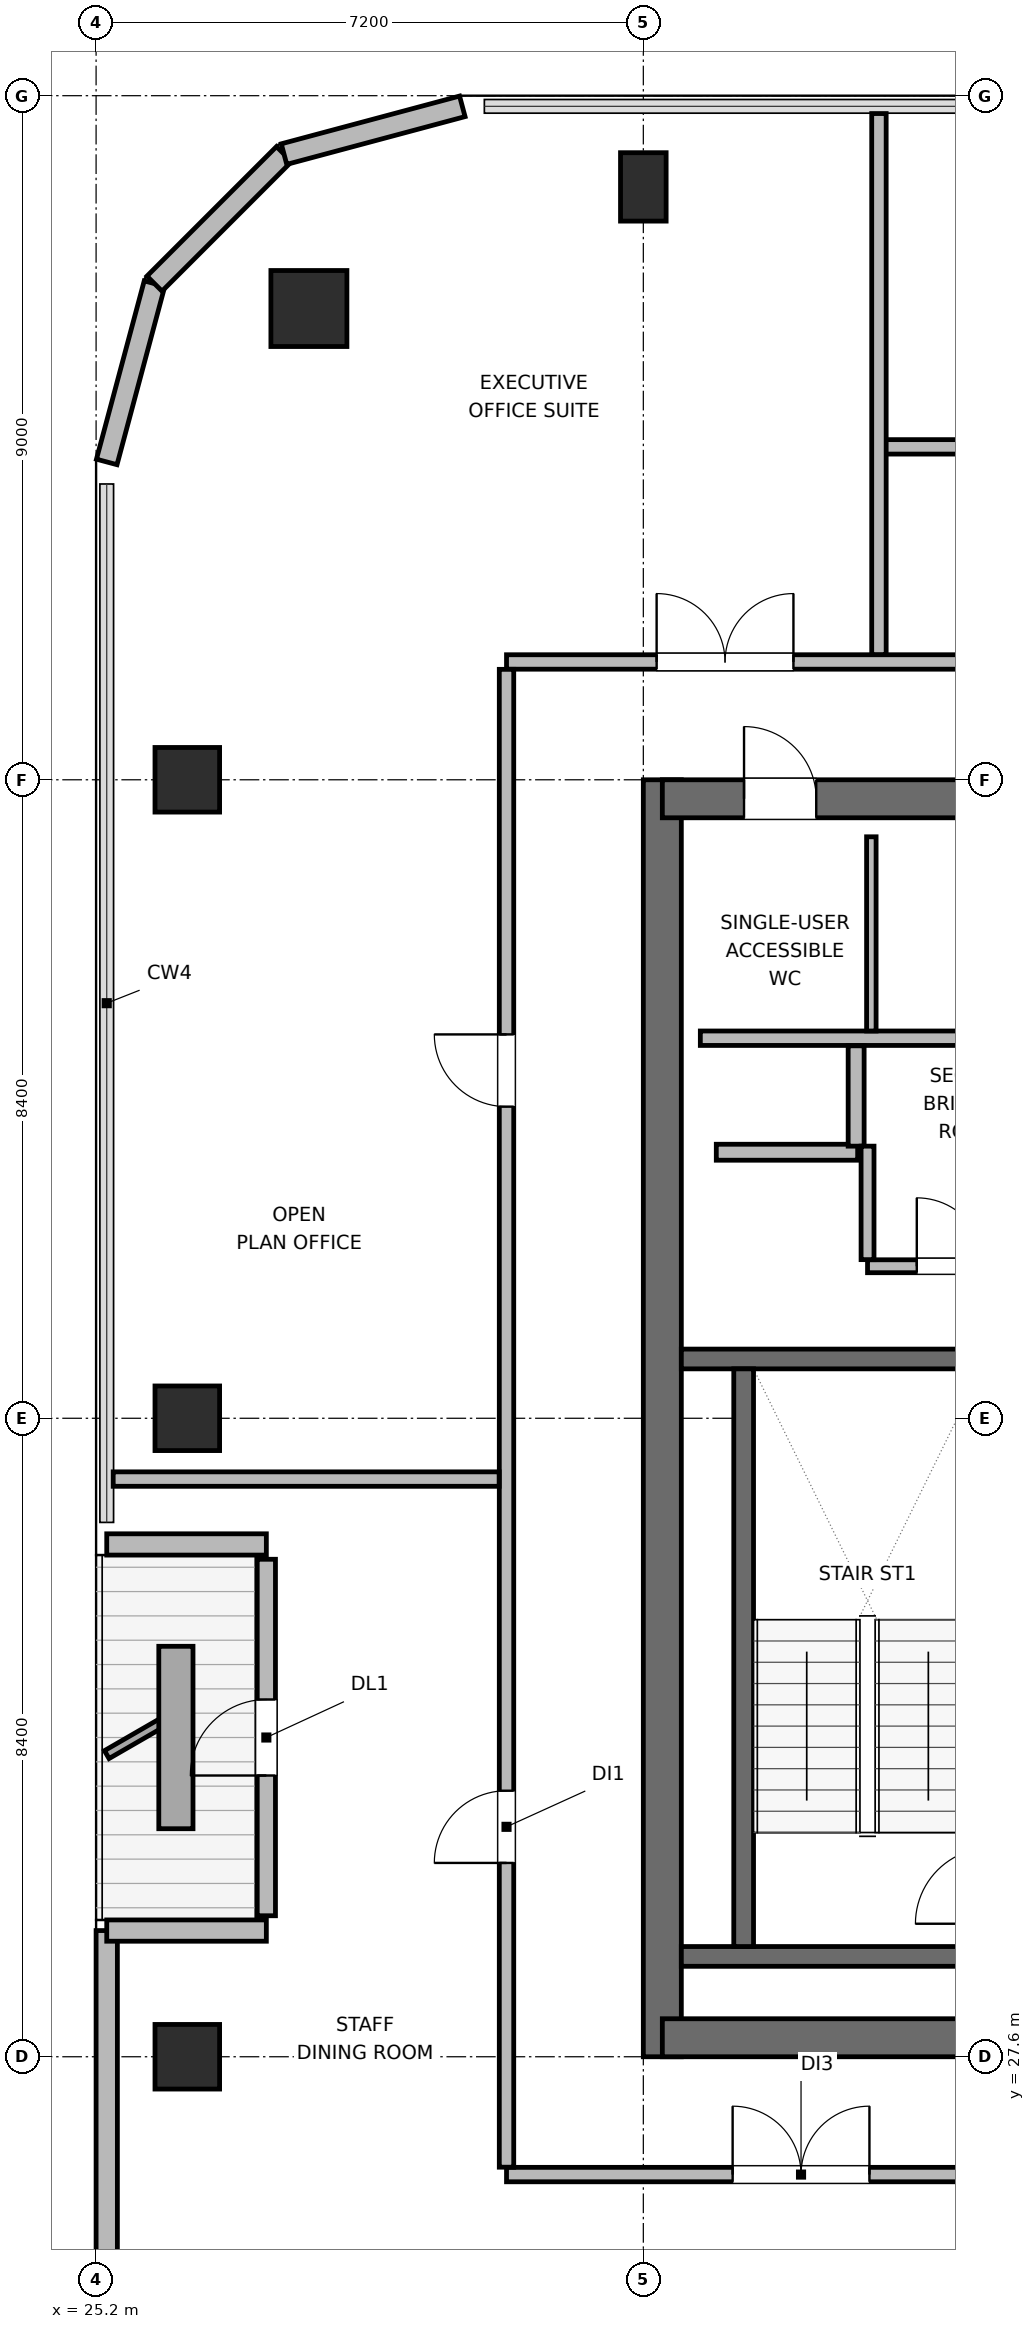
"""IFC4 building model, lengths in metres.
Left out: names, types, materials, properties, quantities, classifications, styles, units other than length and angle.
Written with IfcOpenShell. Run it as: python <this file> out.ifc"""

import sys

from ifc_helpers import new_model, si_unit, direction, frame, frame_2d, origin, origin_2d, place, context, subcontext, project, spatial, rectangle, circle, extrude, element, fill, save


model = new_model("IFC4")
c1 = context("Model", 3, precision=1e-05, world=origin(), true_north=direction((0.0, 1.0)))
c2 = subcontext(c1, "Body", "Model", "MODEL_VIEW")
j1 = project(units=[si_unit("LENGTHUNIT", "METRE"), si_unit("PLANEANGLEUNIT", "RADIAN")], contexts=[c1])
p1 = place(None, origin())
s1 = spatial("IfcSite", under=j1, at=p1, CompositionType="ELEMENT")
p2 = place(p1, origin())
s2 = spatial("IfcBuilding", under=s1, at=p2, CompositionType="ELEMENT")
p3 = place(p2, frame((0.0, 0.0, 325.8)))
s3 = spatial("IfcBuildingStorey", under=s2, at=p3, CompositionType="ELEMENT", Elevation=325.8)
p4 = place(p3, frame((32.65, 27.6, 0.0), z_axis=(0.0, 0.0, 1.0), x_axis=(0.0, 1.0, 0.0)))
e1 = element("IfcWall", 1, at=p4, inside=s3, PredefinedType="SHEAR", context=c2, shape_type="SweptSolid", body=[
    extrude(rectangle(XDim=16.8, YDim=0.5, at=frame_2d((8.4, 0.0))), origin(), (0.0, 0.0, 1.0), 3.9),
])
p5 = place(p3, frame((32.65, 27.85, 0.0), z_axis=(0.0, 0.0, 1.0), x_axis=(1.0, 0.0, 0.0)))
e2 = element("IfcWall", 2, at=p5, inside=s3, PredefinedType="SHEAR", context=c2, shape_type="SweptSolid", body=[
    extrude(rectangle(XDim=9.5, YDim=0.5, at=frame_2d((4.75, 0.0))), origin(), (0.0, 0.0, 1.0), 3.9),
])
p6 = place(p5, frame((5.075, 0.0, 0.0)))
e3 = element("IfcOpeningElement", 3, at=p6, cuts=e2, PredefinedType="OPENING", context=c2, shape_type="SweptSolid", body=[
    extrude(rectangle(XDim=1.05, YDim=2.04, at=frame_2d((0.525, 1.02))), frame((0.0, 0.26, 0.0), z_axis=(0.0, -1.0, 0.0), x_axis=(1.0, 0.0, 0.0)), (0.0, 0.0, 1.0), 0.52),
])
p7 = place(p3, frame((32.65, 44.15, 0.0), z_axis=(0.0, 0.0, 1.0), x_axis=(1.0, 0.0, 0.0)))
e4 = element("IfcWall", 4, at=p7, inside=s3, PredefinedType="SHEAR", context=c2, shape_type="SweptSolid", body=[
    extrude(rectangle(XDim=9.5, YDim=0.5, at=frame_2d((4.75, 0.0))), origin(), (0.0, 0.0, 1.0), 3.9),
])
p8 = place(p7, frame((1.075, 0.0, 0.0)))
e5 = element("IfcOpeningElement", 5, at=p8, cuts=e4, PredefinedType="OPENING", context=c2, shape_type="SweptSolid", body=[
    extrude(rectangle(XDim=0.95, YDim=2.04, at=frame_2d((0.475, 1.02))), frame((0.0, 0.26, 0.0), z_axis=(0.0, -1.0, 0.0), x_axis=(1.0, 0.0, 0.0)), (0.0, 0.0, 1.0), 0.52),
])
p9 = place(p7, frame((4.325, 0.0, 0.0)))
e6 = element("IfcOpeningElement", 6, at=p9, cuts=e4, PredefinedType="OPENING", context=c2, shape_type="SweptSolid", body=[
    extrude(rectangle(XDim=0.9, YDim=2.02, at=frame_2d((0.45, 1.01))), frame((0.0, 0.26, 0.0), z_axis=(0.0, -1.0, 0.0), x_axis=(1.0, 0.0, 0.0)), (0.0, 0.0, 1.0), 0.52),
])
p10 = place(p7, frame((7.225, 0.0, 0.0)))
e7 = element("IfcOpeningElement", 7, at=p10, cuts=e4, PredefinedType="OPENING", context=c2, shape_type="SweptSolid", body=[
    extrude(rectangle(XDim=0.9, YDim=2.02, at=frame_2d((0.45, 1.01))), frame((0.0, 0.26, 0.0), z_axis=(0.0, -1.0, 0.0), x_axis=(1.0, 0.0, 0.0)), (0.0, 0.0, 1.0), 0.52),
])
for number, where, z_axis, x_axis in (
    (8, (32.9, 28.92, 0.0), (0.0, 0.0, 1.0), (1.0, 0.0, 0.0)),
    (9, (32.9, 36.78, 0.0), (0.0, 0.0, 1.0), (1.0, 0.0, 0.0)),
):
    element("IfcWall", number, at=place(p3, frame(where, z_axis=z_axis, x_axis=x_axis)), inside=s3, PredefinedType="SHEAR", context=c2, shape_type="SweptSolid", body=[
        extrude(rectangle(XDim=4.21, YDim=0.26, at=frame_2d((2.105, 0.0))), origin(), (0.0, 0.0, 1.0), 3.9),
    ])
p11 = place(p3, frame((33.72, 29.05, 0.0), z_axis=(0.0, 0.0, 1.0), x_axis=(0.0, 1.0, 0.0)))
e10 = element("IfcWall", 10, at=p11, inside=s3, PredefinedType="SHEAR", context=c2, shape_type="SweptSolid", body=[
    extrude(rectangle(XDim=7.6, YDim=0.26, at=frame_2d((3.8, 0.0))), origin(), (0.0, 0.0, 1.0), 3.9),
])
p12 = place(p3, frame((28.0, 50.6, 0.0), z_axis=(0.0, 0.0, 1.0), x_axis=(1.0, 0.0, 0.0)))
e11 = element("IfcColumn", 11, at=p12, inside=s3, PredefinedType="COLUMN", context=c2, shape_type="SweptSolid", body=[
    extrude(circle(Radius=0.5, at=origin_2d()), origin(), (0.0, 0.0, 1.0), 3.9),
])
p13 = place(p3, frame((32.4, 52.2, 0.0), z_axis=(0.0, 0.0, 1.0), x_axis=(1.0, 0.0, 0.0)))
e12 = element("IfcColumn", 12, at=p13, inside=s3, PredefinedType="COLUMN", context=c2, shape_type="SweptSolid", body=[
    extrude(rectangle(XDim=0.6, YDim=0.9, at=origin_2d()), origin(), (0.0, 0.0, 1.0), 3.9),
])
for number, where, z_axis, x_axis in (
    (13, (26.4, 27.6, 0.0), (0.0, 0.0, 1.0), (1.0, 0.0, 0.0)),
    (14, (26.4, 36.0, 0.0), (0.0, 0.0, 1.0), (1.0, 0.0, 0.0)),
    (15, (26.4, 44.4, 0.0), (0.0, 0.0, 1.0), (1.0, 0.0, 0.0)),
):
    element("IfcColumn", number, at=place(p3, frame(where, z_axis=z_axis, x_axis=x_axis)), inside=s3, PredefinedType="COLUMN", context=c2, shape_type="SweptSolid", body=[
        extrude(rectangle(XDim=0.85, YDim=0.85, at=origin_2d()), origin(), (0.0, 0.0, 1.0), 3.9),
    ])
p14 = place(p3, frame((25.34, 23.418, 0.0), z_axis=(0.0, 0.0, 1.0), x_axis=(0.0, 1.0, 0.0)))
e16 = element("IfcWall", 16, at=p14, inside=s3, PredefinedType="SOLIDWALL", context=c2, shape_type="SweptSolid", body=[
    extrude(rectangle(XDim=5.842, YDim=0.28, at=frame_2d((2.921, 0.0))), origin(), (0.0, 0.0, 1.0), 3.68),
])
p15 = place(p3, frame((25.34, 29.26, 0.0), z_axis=(0.0, 0.0, 1.0), x_axis=(1.0, 0.0, 0.0)))
e17 = element("IfcWall", 17, at=p15, inside=s3, PredefinedType="SOLIDWALL", context=c2, shape_type="SweptSolid", body=[
    extrude(rectangle(XDim=2.1, YDim=0.28, at=frame_2d((1.05, 0.0))), origin(), (0.0, 0.0, 1.0), 3.126),
])
p16 = place(p3, frame((27.44, 29.455, 0.0), z_axis=(0.0, 0.0, 1.0), x_axis=(0.0, 1.0, 0.0)))
e18 = element("IfcWall", 18, at=p16, inside=s3, PredefinedType="SOLIDWALL", context=c2, shape_type="SweptSolid", body=[
    extrude(rectangle(XDim=4.69, YDim=0.24, at=frame_2d((2.345, 0.0))), origin(), (0.0, 0.0, 1.0), 3.311),
])
p17 = place(p16, frame((1.845, 0.0, 0.0)))
e19 = element("IfcOpeningElement", 19, at=p17, cuts=e18, PredefinedType="OPENING", context=c2, shape_type="SweptSolid", body=[
    extrude(rectangle(XDim=1.0, YDim=2.02, at=frame_2d((0.5, 1.01))), frame((0.0, 0.13, 0.0), z_axis=(0.0, -1.0, 0.0), x_axis=(1.0, 0.0, 0.0)), (0.0, 0.0, 1.0), 0.26),
])
p18 = place(p3, frame((27.44, 34.34, 0.0), z_axis=(0.0, 0.0, 1.0), x_axis=(-1.0, 0.0, 0.0)))
e20 = element("IfcWall", 20, at=p18, inside=s3, PredefinedType="SOLIDWALL", context=c2, shape_type="SweptSolid", body=[
    extrude(rectangle(XDim=2.1, YDim=0.28, at=frame_2d((1.05, 0.0))), origin(), (0.0, 0.0, 1.0), 3.126),
])
p19 = place(p3, frame((25.34, 48.582, 0.0), z_axis=(0.0, 0.0, 1.0), x_axis=(0.258751159445, 0.965944013639, 0.0)))
e21 = element("IfcWall", 21, at=p19, inside=s3, PredefinedType="SOLIDWALL", context=c2, shape_type="SweptSolid", body=[
    extrude(rectangle(XDim=2.429, YDim=0.28, at=frame_2d((1.214, 0.0))), origin(), (0.0, 0.0, 1.0), 3.68),
])
p20 = place(p3, frame((25.969, 50.927, 0.0), z_axis=(0.0, 0.0, 1.0), x_axis=(0.707106781187, 0.707106781187, 0.0)))
e22 = element("IfcWall", 22, at=p20, inside=s3, PredefinedType="SOLIDWALL", context=c2, shape_type="SweptSolid", body=[
    extrude(rectangle(XDim=2.41, YDim=0.28, at=frame_2d((1.205, 0.0))), origin(), (0.0, 0.0, 1.0), 3.68),
])
p21 = place(p3, frame((27.673, 52.632, 0.0), z_axis=(0.0, 0.0, 1.0), x_axis=(0.965937282298, 0.25877628691, 0.0)))
e23 = element("IfcWall", 23, at=p21, inside=s3, PredefinedType="SOLIDWALL", context=c2, shape_type="SweptSolid", body=[
    extrude(rectangle(XDim=2.428, YDim=0.28, at=frame_2d((1.214, 0.0))), origin(), (0.0, 0.0, 1.0), 3.68),
])
p22 = place(p3, frame((33.15, 41.0, 0.0), z_axis=(0.0, 0.0, 1.0), x_axis=(1.0, 0.0, 0.0)))
e24 = element("IfcWall", 24, at=p22, inside=s3, PredefinedType="PLUMBINGWALL", context=c2, shape_type="SweptSolid", body=[
    extrude(rectangle(XDim=8.5, YDim=0.19, at=frame_2d((4.25, 0.0))), origin(), (0.0, 0.0, 1.0), 3.68),
])
p23 = place(p3, frame((35.4, 41.095, 0.0), z_axis=(0.0, 0.0, 1.0), x_axis=(0.0, 1.0, 0.0)))
e25 = element("IfcWall", 25, at=p23, inside=s3, PredefinedType="PARTITIONING", context=c2, shape_type="SweptSolid", body=[
    extrude(rectangle(XDim=2.555, YDim=0.125, at=frame_2d((1.277, 0.0))), origin(), (0.0, 0.0, 1.0), 3.68),
])
p24 = place(p3, frame((33.36, 39.5, 0.0), z_axis=(0.0, 0.0, 1.0), x_axis=(1.0, 0.0, 0.0)))
e26 = element("IfcWall", 26, at=p24, inside=s3, PredefinedType="PARTITIONING", context=c2, shape_type="SweptSolid", body=[
    extrude(rectangle(XDim=1.86, YDim=0.21, at=frame_2d((0.93, 0.0))), origin(), (0.0, 0.0, 1.0), 3.68),
])
p25 = place(p3, frame((35.2, 39.58, 0.0), z_axis=(0.0, 0.0, 1.0), x_axis=(0.0, 1.0, 0.0)))
e27 = element("IfcWall", 27, at=p25, inside=s3, PredefinedType="PARTITIONING", context=c2, shape_type="SweptSolid", body=[
    extrude(rectangle(XDim=1.32, YDim=0.21, at=frame_2d((0.66, 0.0))), origin(), (0.0, 0.0, 1.0), 3.68),
])
p26 = place(p3, frame((35.35, 38.0, 0.0), z_axis=(0.0, 0.0, 1.0), x_axis=(1.0, 0.0, 0.0)))
e28 = element("IfcWall", 28, at=p26, inside=s3, PredefinedType="PARTITIONING", context=c2, shape_type="SweptSolid", body=[
    extrude(rectangle(XDim=6.1, YDim=0.17, at=frame_2d((3.05, 0.0))), origin(), (0.0, 0.0, 1.0), 3.68),
])
p27 = place(p26, frame((0.648, 0.0, 0.0)))
e29 = element("IfcOpeningElement", 29, at=p27, cuts=e28, PredefinedType="OPENING", context=c2, shape_type="SweptSolid", body=[
    extrude(rectangle(XDim=0.9, YDim=2.02, at=frame_2d((0.45, 1.01))), frame((0.0, 0.095, 0.0), z_axis=(0.0, -1.0, 0.0), x_axis=(1.0, 0.0, 0.0)), (0.0, 0.0, 1.0), 0.19),
])
p28 = place(p26, frame((3.698, 0.0, 0.0)))
e30 = element("IfcOpeningElement", 30, at=p28, cuts=e28, PredefinedType="OPENING", context=c2, shape_type="SweptSolid", body=[
    extrude(rectangle(XDim=0.9, YDim=2.02, at=frame_2d((0.45, 1.01))), frame((0.0, 0.095, 0.0), z_axis=(0.0, -1.0, 0.0), x_axis=(1.0, 0.0, 0.0)), (0.0, 0.0, 1.0), 0.19),
])
p29 = place(p3, frame((35.35, 38.087, 0.0), z_axis=(0.0, 0.0, 1.0), x_axis=(0.0, 1.0, 0.0)))
e31 = element("IfcWall", 31, at=p29, inside=s3, PredefinedType="PARTITIONING", context=c2, shape_type="SweptSolid", body=[
    extrude(rectangle(XDim=1.493, YDim=0.17, at=frame_2d((0.747, 0.0))), origin(), (0.0, 0.0, 1.0), 3.68),
])
p30 = place(p3, frame((30.6, 26.05, 0.0), z_axis=(0.0, 0.0, 1.0), x_axis=(1.0, 0.0, 0.0)))
e32 = element("IfcWall", 32, at=p30, inside=s3, PredefinedType="PLUMBINGWALL", context=c2, shape_type="SweptSolid", body=[
    extrude(rectangle(XDim=36.3, YDim=0.19, at=frame_2d((18.15, 0.0))), origin(), (0.0, 0.0, 1.0), 3.68),
])
p31 = place(p30, frame((2.975, 0.0, 0.0)))
e33 = element("IfcOpeningElement", 33, at=p31, cuts=e32, PredefinedType="OPENING", context=c2, shape_type="SweptSolid", body=[
    extrude(rectangle(XDim=1.8, YDim=2.06, at=frame_2d((0.9, 1.03))), frame((0.0, 0.105, 0.0), z_axis=(0.0, -1.0, 0.0), x_axis=(1.0, 0.0, 0.0)), (0.0, 0.0, 1.0), 0.21),
])
p32 = place(p30, frame((13.425, 0.0, 0.0)))
e34 = element("IfcOpeningElement", 34, at=p32, cuts=e32, PredefinedType="OPENING", context=c2, shape_type="SweptSolid", body=[
    extrude(rectangle(XDim=1.8, YDim=2.06, at=frame_2d((0.9, 1.03))), frame((0.0, 0.105, 0.0), z_axis=(0.0, -1.0, 0.0), x_axis=(1.0, 0.0, 0.0)), (0.0, 0.0, 1.0), 0.21),
])
p33 = place(p30, frame((28.125, 0.0, 0.0)))
e35 = element("IfcOpeningElement", 35, at=p33, cuts=e32, PredefinedType="OPENING", context=c2, shape_type="SweptSolid", body=[
    extrude(rectangle(XDim=1.8, YDim=2.06, at=frame_2d((0.9, 1.03))), frame((0.0, 0.105, 0.0), z_axis=(0.0, -1.0, 0.0), x_axis=(1.0, 0.0, 0.0)), (0.0, 0.0, 1.0), 0.21),
])
p34 = place(p3, frame((30.6, 45.95, 0.0), z_axis=(0.0, 0.0, 1.0), x_axis=(1.0, 0.0, 0.0)))
e36 = element("IfcWall", 36, at=p34, inside=s3, PredefinedType="PLUMBINGWALL", context=c2, shape_type="SweptSolid", body=[
    extrude(rectangle(XDim=36.3, YDim=0.19, at=frame_2d((18.15, 0.0))), origin(), (0.0, 0.0, 1.0), 3.68),
])
p35 = place(p34, frame((1.975, 0.0, 0.0)))
e37 = element("IfcOpeningElement", 37, at=p35, cuts=e36, PredefinedType="OPENING", context=c2, shape_type="SweptSolid", body=[
    extrude(rectangle(XDim=1.8, YDim=2.06, at=frame_2d((0.9, 1.03))), frame((0.0, 0.105, 0.0), z_axis=(0.0, -1.0, 0.0), x_axis=(1.0, 0.0, 0.0)), (0.0, 0.0, 1.0), 0.21),
])
p36 = place(p34, frame((9.925, 0.0, 0.0)))
e38 = element("IfcOpeningElement", 38, at=p36, cuts=e36, PredefinedType="OPENING", context=c2, shape_type="SweptSolid", body=[
    extrude(rectangle(XDim=1.8, YDim=2.06, at=frame_2d((0.9, 1.03))), frame((0.0, 0.105, 0.0), z_axis=(0.0, -1.0, 0.0), x_axis=(1.0, 0.0, 0.0)), (0.0, 0.0, 1.0), 0.21),
])
p37 = place(p34, frame((20.925, 0.0, 0.0)))
e39 = element("IfcOpeningElement", 39, at=p37, cuts=e36, PredefinedType="OPENING", context=c2, shape_type="SweptSolid", body=[
    extrude(rectangle(XDim=1.8, YDim=2.06, at=frame_2d((0.9, 1.03))), frame((0.0, 0.105, 0.0), z_axis=(0.0, -1.0, 0.0), x_axis=(1.0, 0.0, 0.0)), (0.0, 0.0, 1.0), 0.21),
])
p38 = place(p34, frame((31.125, 0.0, 0.0)))
e40 = element("IfcOpeningElement", 40, at=p38, cuts=e36, PredefinedType="OPENING", context=c2, shape_type="SweptSolid", body=[
    extrude(rectangle(XDim=1.8, YDim=2.06, at=frame_2d((0.9, 1.03))), frame((0.0, 0.105, 0.0), z_axis=(0.0, -1.0, 0.0), x_axis=(1.0, 0.0, 0.0)), (0.0, 0.0, 1.0), 0.21),
])
p39 = place(p3, frame((30.6, 26.147, 0.0), z_axis=(0.0, 0.0, 1.0), x_axis=(0.0, 1.0, 0.0)))
e41 = element("IfcWall", 41, at=p39, inside=s3, PredefinedType="PLUMBINGWALL", context=c2, shape_type="SweptSolid", body=[
    extrude(rectangle(XDim=19.706, YDim=0.19, at=frame_2d((9.853, 0.0))), origin(), (0.0, 0.0, 1.0), 3.68),
])
p40 = place(p39, frame((4.003, 0.0, 0.0)))
e42 = element("IfcOpeningElement", 42, at=p40, cuts=e41, PredefinedType="OPENING", context=c2, shape_type="SweptSolid", body=[
    extrude(rectangle(XDim=0.95, YDim=2.04, at=frame_2d((0.475, 1.02))), frame((0.0, 0.105, 0.0), z_axis=(0.0, -1.0, 0.0), x_axis=(1.0, 0.0, 0.0)), (0.0, 0.0, 1.0), 0.21),
])
p41 = place(p39, frame((13.953, 0.0, 0.0)))
e43 = element("IfcOpeningElement", 43, at=p41, cuts=e41, PredefinedType="OPENING", context=c2, shape_type="SweptSolid", body=[
    extrude(rectangle(XDim=0.95, YDim=2.04, at=frame_2d((0.475, 1.02))), frame((0.0, 0.105, 0.0), z_axis=(0.0, -1.0, 0.0), x_axis=(1.0, 0.0, 0.0)), (0.0, 0.0, 1.0), 0.21),
])
p42 = place(p3, frame((35.5, 48.78, 0.0), z_axis=(0.0, 0.0, 1.0), x_axis=(1.0, 0.0, 0.0)))
e44 = element("IfcWall", 44, at=p42, inside=s3, PredefinedType="PLUMBINGWALL", context=c2, shape_type="SweptSolid", body=[
    extrude(rectangle(XDim=11.0, YDim=0.19, at=frame_2d((5.5, 0.0))), origin(), (0.0, 0.0, 1.0), 3.311),
])
p43 = place(p42, frame((5.05, 0.0, 0.0)))
e45 = element("IfcOpeningElement", 45, at=p43, cuts=e44, PredefinedType="OPENING", context=c2, shape_type="SweptSolid", body=[
    extrude(rectangle(XDim=0.9, YDim=2.02, at=frame_2d((0.45, 1.01))), frame((0.0, 0.105, 0.0), z_axis=(0.0, -1.0, 0.0), x_axis=(1.0, 0.0, 0.0)), (0.0, 0.0, 1.0), 0.21),
])
p44 = place(p3, frame((35.5, 46.047, 0.0), z_axis=(0.0, 0.0, 1.0), x_axis=(0.0, 1.0, 0.0)))
e46 = element("IfcWall", 46, at=p44, inside=s3, PredefinedType="PLUMBINGWALL", context=c2, shape_type="SweptSolid", body=[
    extrude(rectangle(XDim=7.118, YDim=0.19, at=frame_2d((3.559, 0.0))), origin(), (0.0, 0.0, 1.0), 3.68),
])
p45 = place(p3, frame((25.425, 35.2, 0.0), z_axis=(0.0, 0.0, 1.0), x_axis=(1.0, 0.0, 0.0)))
e47 = element("IfcWall", 47, at=p45, inside=s3, PredefinedType="PLUMBINGWALL", context=c2, shape_type="SweptSolid", body=[
    extrude(rectangle(XDim=5.078, YDim=0.19, at=frame_2d((2.539, 0.0))), origin(), (0.0, 0.0, 1.0), 3.68),
])
p46 = place(p17, origin())
e48 = element("IfcDoor", 48, at=p46, inside=s3, OperationType="SINGLE_SWING_LEFT", PredefinedType="DOOR", context=c2, shape_type="SweptSolid", body=[
    extrude(rectangle(XDim=1.0, YDim=2.02, at=frame_2d((0.5, 1.01))), frame((0.0, 0.025, 0.0), z_axis=(0.0, -1.0, 0.0), x_axis=(1.0, 0.0, 0.0)), (0.0, 0.0, 1.0), 0.05),
])
fill(e19, e48)
p47 = place(p8, origin())
e49 = element("IfcDoor", 49, at=p47, inside=s3, OperationType="SINGLE_SWING_LEFT", PredefinedType="DOOR", context=c2, shape_type="SweptSolid", body=[
    extrude(rectangle(XDim=0.95, YDim=2.04, at=frame_2d((0.475, 1.02))), frame((0.0, 0.025, 0.0), z_axis=(0.0, -1.0, 0.0), x_axis=(1.0, 0.0, 0.0)), (0.0, 0.0, 1.0), 0.05),
])
fill(e5, e49)
p48 = place(p27, origin())
e50 = element("IfcDoor", 50, at=p48, inside=s3, OperationType="SINGLE_SWING_LEFT", PredefinedType="DOOR", context=c2, shape_type="SweptSolid", body=[
    extrude(rectangle(XDim=0.9, YDim=2.02, at=frame_2d((0.45, 1.01))), frame((0.0, 0.025, 0.0), z_axis=(0.0, -1.0, 0.0), x_axis=(1.0, 0.0, 0.0)), (0.0, 0.0, 1.0), 0.05),
])
fill(e29, e50)
p49 = place(p31, origin())
e51 = element("IfcDoor", 51, at=p49, inside=s3, OperationType="DOUBLE_DOOR_SINGLE_SWING", PredefinedType="DOOR", context=c2, shape_type="SweptSolid", body=[
    extrude(rectangle(XDim=1.8, YDim=2.06, at=frame_2d((0.9, 1.03))), frame((0.0, 0.025, 0.0), z_axis=(0.0, -1.0, 0.0), x_axis=(1.0, 0.0, 0.0)), (0.0, 0.0, 1.0), 0.05),
])
fill(e33, e51)
p50 = place(p35, origin())
e52 = element("IfcDoor", 52, at=p50, inside=s3, OperationType="DOUBLE_DOOR_SINGLE_SWING", PredefinedType="DOOR", context=c2, shape_type="SweptSolid", body=[
    extrude(rectangle(XDim=1.8, YDim=2.06, at=frame_2d((0.9, 1.03))), frame((0.0, 0.025, 0.0), z_axis=(0.0, -1.0, 0.0), x_axis=(1.0, 0.0, 0.0)), (0.0, 0.0, 1.0), 0.05),
])
fill(e37, e52)
p51 = place(p40, origin())
e53 = element("IfcDoor", 53, at=p51, inside=s3, OperationType="SINGLE_SWING_LEFT", PredefinedType="DOOR", context=c2, shape_type="SweptSolid", body=[
    extrude(rectangle(XDim=0.95, YDim=2.04, at=frame_2d((0.475, 1.02))), frame((0.0, 0.025, 0.0), z_axis=(0.0, -1.0, 0.0), x_axis=(1.0, 0.0, 0.0)), (0.0, 0.0, 1.0), 0.05),
])
fill(e42, e53)
p52 = place(p41, origin())
e54 = element("IfcDoor", 54, at=p52, inside=s3, OperationType="SINGLE_SWING_RIGHT", PredefinedType="DOOR", context=c2, shape_type="SweptSolid", body=[
    extrude(rectangle(XDim=0.95, YDim=2.04, at=frame_2d((0.475, 1.02))), frame((0.0, 0.025, 0.0), z_axis=(0.0, -1.0, 0.0), x_axis=(1.0, 0.0, 0.0)), (0.0, 0.0, 1.0), 0.05),
])
fill(e43, e54)
save(model, sys.argv[1])
